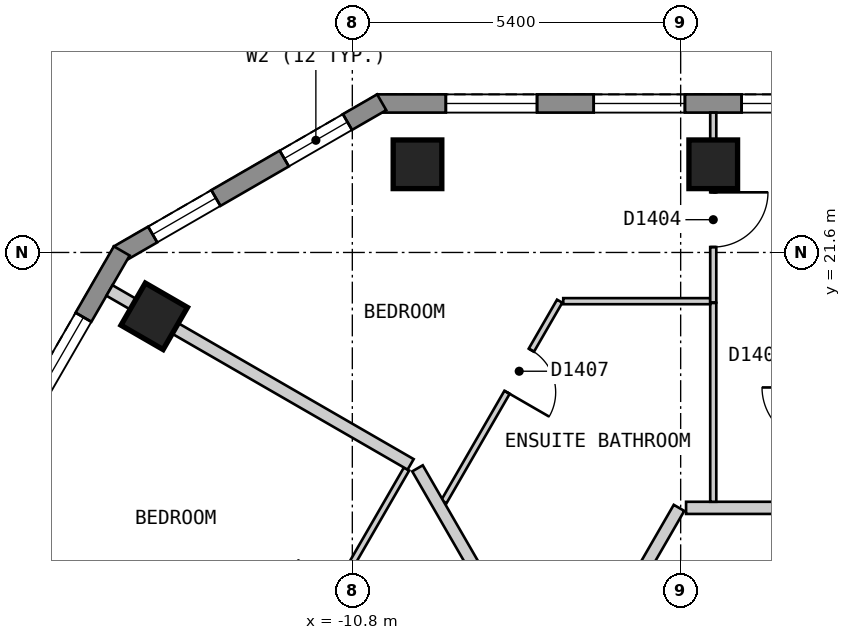
"""IFC4 building model, lengths in metres.
Left out: names, types, materials, properties, quantities, classifications, styles, units other than length and angle.
Written with IfcOpenShell. Run it as: python <this file> out.ifc"""

import sys

from ifc_helpers import new_model, si_unit, direction, frame, frame_2d, origin, origin_2d, place, context, subcontext, project, spatial, polyline, rectangle, outline, extrude, element, fill, save


model = new_model("IFC4")
c1 = context("Model", 3, precision=1e-05, world=origin(), true_north=direction((0.0, 1.0)))
c2 = subcontext(c1, "Body", "Model", "MODEL_VIEW")
j1 = project(units=[si_unit("LENGTHUNIT", "METRE"), si_unit("PLANEANGLEUNIT", "RADIAN")], contexts=[c1])
p1 = place(None, origin())
s1 = spatial("IfcSite", under=j1, at=p1, CompositionType="ELEMENT")
p2 = place(p1, origin())
s2 = spatial("IfcBuilding", under=s1, at=p2, CompositionType="ELEMENT")
p3 = place(p2, frame((0.0, 0.0, 172.2)))
s3 = spatial("IfcBuildingStorey", under=s2, at=p3, CompositionType="ELEMENT", Elevation=172.2)
for number, where, z_axis, x_axis in (
    (1, (-4.864, 23.05, 0.0), (0.0, 0.0, 1.0), (-1.0, 0.0, 0.0)),
    (2, (-9.728, 23.05, 0.0), (0.0, 0.0, 1.0), (-1.0, 0.0, 0.0)),
    (3, (-14.058, 20.55, 0.0), (0.0, 0.0, 1.0), (-0.5, -0.866, 0.0)),
):
    element("IfcColumn", number, at=place(p3, frame(where, z_axis=z_axis, x_axis=x_axis)), inside=s3, PredefinedType="COLUMN", context=c2, shape_type="SweptSolid", body=[
        extrude(rectangle(XDim=0.8, YDim=0.8, at=origin_2d()), origin(), (0.0, 0.0, 1.0), 3.0),
    ])
p4 = place(p3, frame((10.392, 24.05, 0.0), z_axis=(0.0, 0.0, 1.0), x_axis=(-1.0, 0.0, 0.0)))
e4 = element("IfcWall", 4, at=p4, inside=s3, PredefinedType="SOLIDWALL", context=c2, shape_type="SweptSolid", body=[
    extrude(outline(polyline([(0.0, -0.15), (20.784, -0.15), (20.704, 0.15), (0.08, 0.15), (0.0, -0.15)])), origin(), (0.0, 0.0, 1.0), 2.7),
])
p5 = place(p4, frame((1.13, 0.0, 0.15)))
e5 = element("IfcOpeningElement", 5, at=p5, cuts=e4, PredefinedType="OPENING", context=c2, shape_type="SweptSolid", body=[
    extrude(rectangle(XDim=1.5, YDim=2.1, at=frame_2d((0.75, 1.05))), frame((0.0, 0.16, 0.0), z_axis=(0.0, -1.0, 0.0), x_axis=(1.0, 0.0, 0.0)), (0.0, 0.0, 1.0), 0.32),
])
p6 = place(p4, frame((3.562, 0.0, 0.15)))
e6 = element("IfcOpeningElement", 6, at=p6, cuts=e4, PredefinedType="OPENING", context=c2, shape_type="SweptSolid", body=[
    extrude(rectangle(XDim=1.5, YDim=2.1, at=frame_2d((0.75, 1.05))), frame((0.0, 0.16, 0.0), z_axis=(0.0, -1.0, 0.0), x_axis=(1.0, 0.0, 0.0)), (0.0, 0.0, 1.0), 0.32),
])
p7 = place(p4, frame((5.994, 0.0, 0.15)))
e7 = element("IfcOpeningElement", 7, at=p7, cuts=e4, PredefinedType="OPENING", context=c2, shape_type="SweptSolid", body=[
    extrude(rectangle(XDim=1.5, YDim=2.1, at=frame_2d((0.75, 1.05))), frame((0.0, 0.16, 0.0), z_axis=(0.0, -1.0, 0.0), x_axis=(1.0, 0.0, 0.0)), (0.0, 0.0, 1.0), 0.32),
])
p8 = place(p4, frame((8.426, 0.0, 0.15)))
e8 = element("IfcOpeningElement", 8, at=p8, cuts=e4, PredefinedType="OPENING", context=c2, shape_type="SweptSolid", body=[
    extrude(rectangle(XDim=1.5, YDim=2.1, at=frame_2d((0.75, 1.05))), frame((0.0, 0.16, 0.0), z_axis=(0.0, -1.0, 0.0), x_axis=(1.0, 0.0, 0.0)), (0.0, 0.0, 1.0), 0.32),
])
p9 = place(p4, frame((10.858, 0.0, 0.15)))
e9 = element("IfcOpeningElement", 9, at=p9, cuts=e4, PredefinedType="OPENING", context=c2, shape_type="SweptSolid", body=[
    extrude(rectangle(XDim=1.5, YDim=2.1, at=frame_2d((0.75, 1.05))), frame((0.0, 0.16, 0.0), z_axis=(0.0, -1.0, 0.0), x_axis=(1.0, 0.0, 0.0)), (0.0, 0.0, 1.0), 0.32),
])
p10 = place(p4, frame((13.29, 0.0, 0.15)))
e10 = element("IfcOpeningElement", 10, at=p10, cuts=e4, PredefinedType="OPENING", context=c2, shape_type="SweptSolid", body=[
    extrude(rectangle(XDim=1.5, YDim=2.1, at=frame_2d((0.75, 1.05))), frame((0.0, 0.16, 0.0), z_axis=(0.0, -1.0, 0.0), x_axis=(1.0, 0.0, 0.0)), (0.0, 0.0, 1.0), 0.32),
])
p11 = place(p4, frame((15.722, 0.0, 0.15)))
e11 = element("IfcOpeningElement", 11, at=p11, cuts=e4, PredefinedType="OPENING", context=c2, shape_type="SweptSolid", body=[
    extrude(rectangle(XDim=1.5, YDim=2.1, at=frame_2d((0.75, 1.05))), frame((0.0, 0.16, 0.0), z_axis=(0.0, -1.0, 0.0), x_axis=(1.0, 0.0, 0.0)), (0.0, 0.0, 1.0), 0.32),
])
p12 = place(p4, frame((18.154, 0.0, 0.15)))
e12 = element("IfcOpeningElement", 12, at=p12, cuts=e4, PredefinedType="OPENING", context=c2, shape_type="SweptSolid", body=[
    extrude(rectangle(XDim=1.5, YDim=2.1, at=frame_2d((0.75, 1.05))), frame((0.0, 0.16, 0.0), z_axis=(0.0, -1.0, 0.0), x_axis=(1.0, 0.0, 0.0)), (0.0, 0.0, 1.0), 0.32),
])
p13 = place(p3, frame((-10.317, 24.07, 0.0), z_axis=(0.0, 0.0, 1.0), x_axis=(-0.866022959057, -0.500004234368, 0.0)))
e13 = element("IfcWall", 13, at=p13, inside=s3, PredefinedType="SOLIDWALL", context=c2, shape_type="SweptSolid", body=[
    extrude(outline(polyline([(0.0, -0.15), (5.0, -0.15), (4.92, 0.15), (0.08, 0.15), (0.0, -0.15)])), origin(), (0.0, 0.0, 1.0), 2.7),
])
p14 = place(p13, frame((0.65, 0.0, 0.15)))
e14 = element("IfcOpeningElement", 14, at=p14, cuts=e13, PredefinedType="OPENING", context=c2, shape_type="SweptSolid", body=[
    extrude(rectangle(XDim=1.2, YDim=2.1, at=frame_2d((0.6, 1.05))), frame((0.0, 0.16, 0.0), z_axis=(0.0, -1.0, 0.0), x_axis=(1.0, 0.0, 0.0)), (0.0, 0.0, 1.0), 0.32),
])
p15 = place(p13, frame((3.149, 0.0, 0.15)))
e15 = element("IfcOpeningElement", 15, at=p15, cuts=e13, PredefinedType="OPENING", context=c2, shape_type="SweptSolid", body=[
    extrude(rectangle(XDim=1.2, YDim=2.1, at=frame_2d((0.6, 1.05))), frame((0.0, 0.16, 0.0), z_axis=(0.0, -1.0, 0.0), x_axis=(1.0, 0.0, 0.0)), (0.0, 0.0, 1.0), 0.32),
])
p16 = place(p3, frame((-14.592, 21.625, 0.0), z_axis=(0.0, 0.0, 1.0), x_axis=(-0.500010537973, -0.866019319597, 0.0)))
e16 = element("IfcWall", 16, at=p16, inside=s3, PredefinedType="SOLIDWALL", context=c2, shape_type="SweptSolid", body=[
    extrude(outline(polyline([(0.0, -0.15), (22.863, -0.15), (22.783, 0.15), (0.08, 0.15), (0.0, -0.15)])), origin(), (0.0, 0.0, 1.0), 2.7),
])
p17 = place(p16, frame((1.259, 0.0, 0.15)))
e17 = element("IfcOpeningElement", 17, at=p17, cuts=e16, PredefinedType="OPENING", context=c2, shape_type="SweptSolid", body=[
    extrude(rectangle(XDim=1.5, YDim=2.1, at=frame_2d((0.75, 1.05))), frame((0.0, 0.16, 0.0), z_axis=(0.0, -1.0, 0.0), x_axis=(1.0, 0.0, 0.0)), (0.0, 0.0, 1.0), 0.32),
])
p18 = place(p16, frame((3.952, 0.0, 0.15)))
e18 = element("IfcOpeningElement", 18, at=p18, cuts=e16, PredefinedType="OPENING", context=c2, shape_type="SweptSolid", body=[
    extrude(rectangle(XDim=1.5, YDim=2.1, at=frame_2d((0.75, 1.05))), frame((0.0, 0.16, 0.0), z_axis=(0.0, -1.0, 0.0), x_axis=(1.0, 0.0, 0.0)), (0.0, 0.0, 1.0), 0.32),
])
p19 = place(p16, frame((6.644, 0.0, 0.15)))
e19 = element("IfcOpeningElement", 19, at=p19, cuts=e16, PredefinedType="OPENING", context=c2, shape_type="SweptSolid", body=[
    extrude(rectangle(XDim=1.5, YDim=2.1, at=frame_2d((0.75, 1.05))), frame((0.0, 0.16, 0.0), z_axis=(0.0, -1.0, 0.0), x_axis=(1.0, 0.0, 0.0)), (0.0, 0.0, 1.0), 0.32),
])
p20 = place(p16, frame((9.335, 0.0, 0.15)))
e20 = element("IfcOpeningElement", 20, at=p20, cuts=e16, PredefinedType="OPENING", context=c2, shape_type="SweptSolid", body=[
    extrude(rectangle(XDim=1.5, YDim=2.1, at=frame_2d((0.75, 1.05))), frame((0.0, 0.16, 0.0), z_axis=(0.0, -1.0, 0.0), x_axis=(1.0, 0.0, 0.0)), (0.0, 0.0, 1.0), 0.32),
])
p21 = place(p16, frame((12.028, 0.0, 0.15)))
e21 = element("IfcOpeningElement", 21, at=p21, cuts=e16, PredefinedType="OPENING", context=c2, shape_type="SweptSolid", body=[
    extrude(rectangle(XDim=1.5, YDim=2.1, at=frame_2d((0.75, 1.05))), frame((0.0, 0.16, 0.0), z_axis=(0.0, -1.0, 0.0), x_axis=(1.0, 0.0, 0.0)), (0.0, 0.0, 1.0), 0.32),
])
p22 = place(p16, frame((14.72, 0.0, 0.15)))
e22 = element("IfcOpeningElement", 22, at=p22, cuts=e16, PredefinedType="OPENING", context=c2, shape_type="SweptSolid", body=[
    extrude(rectangle(XDim=1.5, YDim=2.1, at=frame_2d((0.75, 1.05))), frame((0.0, 0.16, 0.0), z_axis=(0.0, -1.0, 0.0), x_axis=(1.0, 0.0, 0.0)), (0.0, 0.0, 1.0), 0.32),
])
p23 = place(p16, frame((17.411, 0.0, 0.15)))
e23 = element("IfcOpeningElement", 23, at=p23, cuts=e16, PredefinedType="OPENING", context=c2, shape_type="SweptSolid", body=[
    extrude(rectangle(XDim=1.5, YDim=2.1, at=frame_2d((0.75, 1.05))), frame((0.0, 0.16, 0.0), z_axis=(0.0, -1.0, 0.0), x_axis=(1.0, 0.0, 0.0)), (0.0, 0.0, 1.0), 0.32),
])
p24 = place(p16, frame((20.104, 0.0, 0.15)))
e24 = element("IfcOpeningElement", 24, at=p24, cuts=e16, PredefinedType="OPENING", context=c2, shape_type="SweptSolid", body=[
    extrude(rectangle(XDim=1.5, YDim=2.1, at=frame_2d((0.75, 1.05))), frame((0.0, 0.16, 0.0), z_axis=(0.0, -1.0, 0.0), x_axis=(1.0, 0.0, 0.0)), (0.0, 0.0, 1.0), 0.32),
])
p25 = place(p3, frame((-5.311, 17.4, 0.0), z_axis=(0.0, 0.0, 1.0), x_axis=(1.0, 0.0, 0.0)))
e25 = element("IfcWall", 25, at=p25, inside=s3, PredefinedType="PARTITIONING", context=c2, shape_type="SweptSolid", body=[
    extrude(rectangle(XDim=10.075, YDim=0.2, at=frame_2d((5.038, 0.0))), origin(), (0.0, 0.0, 1.0), 2.7),
])
p26 = place(p25, frame((2.429, 0.0, 0.0)))
e26 = element("IfcOpeningElement", 26, at=p26, cuts=e25, PredefinedType="OPENING", context=c2, shape_type="SweptSolid", body=[
    extrude(rectangle(XDim=0.9, YDim=2.1, at=frame_2d((0.45, 1.05))), frame((0.0, 0.11, 0.0), z_axis=(0.0, -1.0, 0.0), x_axis=(1.0, 0.0, 0.0)), (0.0, 0.0, 1.0), 0.22),
])
p27 = place(p3, frame((-10.854, 8.0, 0.0), z_axis=(0.0, 0.0, 1.0), x_axis=(0.499997637144, 0.866026767976, 0.0)))
e27 = element("IfcWall", 27, at=p27, inside=s3, PredefinedType="PARTITIONING", context=c2, shape_type="SweptSolid", body=[
    extrude(rectangle(XDim=10.854, YDim=0.2, at=frame_2d((5.427, 0.0))), origin(), (0.0, 0.0, 1.0), 2.7),
])
p28 = place(p27, frame((0.721, 0.0, 0.0)))
e28 = element("IfcOpeningElement", 28, at=p28, cuts=e27, PredefinedType="OPENING", context=c2, shape_type="SweptSolid", body=[
    extrude(rectangle(XDim=1.0, YDim=2.1, at=frame_2d((0.5, 1.05))), frame((0.0, 0.11, 0.0), z_axis=(0.0, -1.0, 0.0), x_axis=(1.0, 0.0, 0.0)), (0.0, 0.0, 1.0), 0.22),
])
p29 = place(p3, frame((-4.864, 20.769, 0.0), z_axis=(0.0, 0.0, 1.0), x_axis=(0.0, -1.0, 0.0)))
e29 = element("IfcWall", 29, at=p29, inside=s3, PredefinedType="PARTITIONING", context=c2, shape_type="SweptSolid", body=[
    extrude(rectangle(XDim=3.269, YDim=0.1, at=frame_2d((1.635, 0.0))), origin(), (0.0, 0.0, 1.0), 2.7),
])
p30 = place(p3, frame((-7.331, 20.799, 0.0), z_axis=(0.0, 0.0, 1.0), x_axis=(1.0, 0.0, 0.0)))
e30 = element("IfcWall", 30, at=p30, inside=s3, PredefinedType="PARTITIONING", context=c2, shape_type="SweptSolid", body=[
    extrude(rectangle(XDim=2.417, YDim=0.1, at=frame_2d((1.208, 0.0))), origin(), (0.0, 0.0, 1.0), 2.7),
])
p31 = place(p3, frame((-9.295, 17.5, 0.0), z_axis=(0.0, 0.0, 1.0), x_axis=(0.500060839138, 0.865990275442, 0.0)))
e31 = element("IfcWall", 31, at=p31, inside=s3, PredefinedType="PARTITIONING", context=c2, shape_type="SweptSolid", body=[
    extrude(rectangle(XDim=3.81, YDim=0.1, at=frame_2d((1.905, 0.0))), origin(), (0.0, 0.0, 1.0), 2.7),
])
p32 = place(p31, frame((2.079, 0.0, 0.0)))
e32 = element("IfcOpeningElement", 32, at=p32, cuts=e31, PredefinedType="OPENING", context=c2, shape_type="SweptSolid", body=[
    extrude(rectangle(XDim=0.8, YDim=2.1, at=frame_2d((0.4, 1.05))), frame((0.0, 0.06, 0.0), z_axis=(0.0, -1.0, 0.0), x_axis=(1.0, 0.0, 0.0)), (0.0, 0.0, 1.0), 0.12),
])
p33 = place(p3, frame((-15.704, 8.0, 0.0), z_axis=(0.0, 0.0, 1.0), x_axis=(0.500005637941, 0.866022148693, 0.0)))
e33 = element("IfcWall", 33, at=p33, inside=s3, PredefinedType="PARTITIONING", context=c2, shape_type="SweptSolid", body=[
    extrude(rectangle(XDim=11.592, YDim=0.1, at=frame_2d((5.796, 0.0))), origin(), (0.0, 0.0, 1.0), 2.7),
])
p34 = place(p33, frame((3.132, 0.0, 0.0)))
e34 = element("IfcOpeningElement", 34, at=p34, cuts=e33, PredefinedType="OPENING", context=c2, shape_type="SweptSolid", body=[
    extrude(rectangle(XDim=0.9, YDim=2.1, at=frame_2d((0.45, 1.05))), frame((0.0, 0.06, 0.0), z_axis=(0.0, -1.0, 0.0), x_axis=(1.0, 0.0, 0.0)), (0.0, 0.0, 1.0), 0.12),
])
p35 = place(p33, frame((8.6, 0.0, 0.0)))
e35 = element("IfcOpeningElement", 35, at=p35, cuts=e33, PredefinedType="OPENING", context=c2, shape_type="SweptSolid", body=[
    extrude(rectangle(XDim=0.8, YDim=2.1, at=frame_2d((0.4, 1.05))), frame((0.0, 0.06, 0.0), z_axis=(0.0, -1.0, 0.0), x_axis=(1.0, 0.0, 0.0)), (0.0, 0.0, 1.0), 0.12),
])
p36 = place(p3, frame((-4.864, 20.779, 0.0), z_axis=(0.0, 0.0, 1.0), x_axis=(0.0, 1.0, 0.0)))
e36 = element("IfcWall", 36, at=p36, inside=s3, PredefinedType="PARTITIONING", context=c2, shape_type="SweptSolid", body=[
    extrude(rectangle(XDim=3.121, YDim=0.1, at=frame_2d((1.561, 0.0))), origin(), (0.0, 0.0, 1.0), 2.7),
])
p37 = place(p36, frame((0.91, 0.0, 0.0)))
e37 = element("IfcOpeningElement", 37, at=p37, cuts=e36, PredefinedType="OPENING", context=c2, shape_type="SweptSolid", body=[
    extrude(rectangle(XDim=0.9, YDim=2.1, at=frame_2d((0.45, 1.05))), frame((0.0, 0.06, 0.0), z_axis=(0.0, -1.0, 0.0), x_axis=(1.0, 0.0, 0.0)), (0.0, 0.0, 1.0), 0.12),
])
p38 = place(p3, frame((-9.728, 18.05, 0.0), z_axis=(0.0, 0.0, 1.0), x_axis=(0.499921709333, -0.866070600204, 0.0)))
e38 = element("IfcWall", 38, at=p38, inside=s3, PredefinedType="PARTITIONING", context=c2, shape_type="SweptSolid", body=[
    extrude(rectangle(XDim=4.561, YDim=0.2, at=frame_2d((2.28, 0.0))), origin(), (0.0, 0.0, 1.0), 2.7),
])
p39 = place(p3, frame((-14.794, 20.975, 0.0), z_axis=(0.0, 0.0, 1.0), x_axis=(0.865982978614, -0.500073475352, 0.0)))
e39 = element("IfcWall", 39, at=p39, inside=s3, PredefinedType="PARTITIONING", context=c2, shape_type="SweptSolid", body=[
    extrude(rectangle(XDim=5.719, YDim=0.2, at=frame_2d((2.86, 0.0))), origin(), (0.0, 0.0, 1.0), 2.7),
])
p40 = place(p10, origin())
e40 = element("IfcWindow", 40, at=p40, inside=s3, PartitioningType="SINGLE_PANEL", PredefinedType="WINDOW", context=c2, shape_type="SweptSolid", body=[
    extrude(rectangle(XDim=1.5, YDim=2.1, at=frame_2d((0.75, 1.05))), frame((0.0, 0.03, 0.0), z_axis=(0.0, -1.0, 0.0), x_axis=(1.0, 0.0, 0.0)), (0.0, 0.0, 1.0), 0.06),
])
fill(e10, e40)
p41 = place(p11, origin())
e41 = element("IfcWindow", 41, at=p41, inside=s3, PartitioningType="SINGLE_PANEL", PredefinedType="WINDOW", context=c2, shape_type="SweptSolid", body=[
    extrude(rectangle(XDim=1.5, YDim=2.1, at=frame_2d((0.75, 1.05))), frame((0.0, 0.03, 0.0), z_axis=(0.0, -1.0, 0.0), x_axis=(1.0, 0.0, 0.0)), (0.0, 0.0, 1.0), 0.06),
])
fill(e11, e41)
p42 = place(p12, origin())
e42 = element("IfcWindow", 42, at=p42, inside=s3, PartitioningType="SINGLE_PANEL", PredefinedType="WINDOW", context=c2, shape_type="SweptSolid", body=[
    extrude(rectangle(XDim=1.5, YDim=2.1, at=frame_2d((0.75, 1.05))), frame((0.0, 0.03, 0.0), z_axis=(0.0, -1.0, 0.0), x_axis=(1.0, 0.0, 0.0)), (0.0, 0.0, 1.0), 0.06),
])
fill(e12, e42)
p43 = place(p14, origin())
e43 = element("IfcWindow", 43, at=p43, inside=s3, PartitioningType="SINGLE_PANEL", PredefinedType="WINDOW", context=c2, shape_type="SweptSolid", body=[
    extrude(rectangle(XDim=1.2, YDim=2.1, at=frame_2d((0.6, 1.05))), frame((0.0, 0.03, 0.0), z_axis=(0.0, -1.0, 0.0), x_axis=(1.0, 0.0, 0.0)), (0.0, 0.0, 1.0), 0.06),
])
fill(e14, e43)
p44 = place(p15, origin())
e44 = element("IfcWindow", 44, at=p44, inside=s3, PartitioningType="SINGLE_PANEL", PredefinedType="WINDOW", context=c2, shape_type="SweptSolid", body=[
    extrude(rectangle(XDim=1.2, YDim=2.1, at=frame_2d((0.6, 1.05))), frame((0.0, 0.03, 0.0), z_axis=(0.0, -1.0, 0.0), x_axis=(1.0, 0.0, 0.0)), (0.0, 0.0, 1.0), 0.06),
])
fill(e15, e44)
p45 = place(p17, origin())
e45 = element("IfcWindow", 45, at=p45, inside=s3, PartitioningType="SINGLE_PANEL", PredefinedType="WINDOW", context=c2, shape_type="SweptSolid", body=[
    extrude(rectangle(XDim=1.5, YDim=2.1, at=frame_2d((0.75, 1.05))), frame((0.0, 0.03, 0.0), z_axis=(0.0, -1.0, 0.0), x_axis=(1.0, 0.0, 0.0)), (0.0, 0.0, 1.0), 0.06),
])
fill(e17, e45)
p46 = place(p37, origin())
e46 = element("IfcDoor", 46, at=p46, inside=s3, OperationType="SINGLE_SWING_RIGHT", PredefinedType="DOOR", context=c2, shape_type="SweptSolid", body=[
    extrude(rectangle(XDim=0.9, YDim=2.1, at=frame_2d((0.45, 1.05))), frame((0.0, 0.025, 0.0), z_axis=(0.0, -1.0, 0.0), x_axis=(1.0, 0.0, 0.0)), (0.0, 0.0, 1.0), 0.05),
])
fill(e37, e46)
p47 = place(p32, origin())
e47 = element("IfcDoor", 47, at=p47, inside=s3, OperationType="SINGLE_SWING_LEFT", PredefinedType="DOOR", context=c2, shape_type="SweptSolid", body=[
    extrude(rectangle(XDim=0.8, YDim=2.1, at=frame_2d((0.4, 1.05))), frame((0.0, 0.025, 0.0), z_axis=(0.0, -1.0, 0.0), x_axis=(1.0, 0.0, 0.0)), (0.0, 0.0, 1.0), 0.05),
])
fill(e32, e47)
save(model, sys.argv[1])
